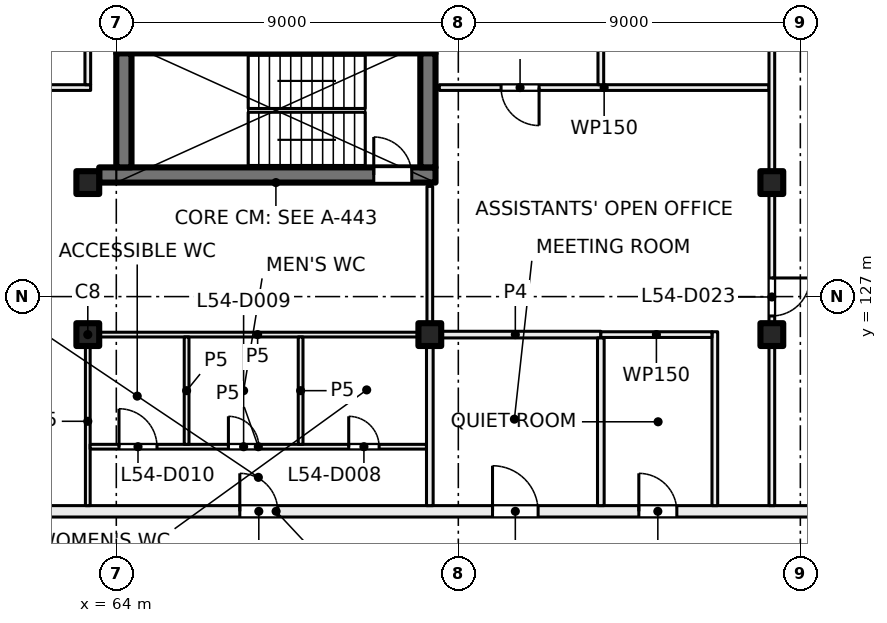
"""IFC4 building model, lengths in metres.
Left out: names, types, materials, properties, quantities, classifications, styles, units other than length and angle.
Written with IfcOpenShell. Run it as: python <this file> out.ifc"""

import sys

from ifc_helpers import new_model, si_unit, direction, frame, frame_2d, origin, origin_2d, place, context, subcontext, project, spatial, rectangle, extrude, element, fill, save


model = new_model("IFC4")
c1 = context("Model", 3, precision=1e-05, world=origin(), true_north=direction((0.0, 1.0)))
c2 = subcontext(c1, "Body", "Model", "MODEL_VIEW")
j1 = project(units=[si_unit("LENGTHUNIT", "METRE"), si_unit("PLANEANGLEUNIT", "RADIAN")], contexts=[c1])
p1 = place(None, origin())
s1 = spatial("IfcSite", under=j1, at=p1, CompositionType="ELEMENT")
p2 = place(p1, origin())
s2 = spatial("IfcBuilding", under=s1, at=p2, CompositionType="ELEMENT")
p3 = place(p2, frame((0.0, 0.0, 228.0)))
s3 = spatial("IfcBuildingStorey", under=s2, at=p3, CompositionType="ELEMENT", Elevation=228.0)
for number, where, z_axis, x_axis in (
    (1, (63.25, 130.0, 0.0), (0.0, 0.0, 1.0), (1.0, 0.0, 0.0)),
    (2, (81.25, 130.0, 0.0), (0.0, 0.0, 1.0), (1.0, 0.0, 0.0)),
    (3, (63.25, 126.0, 0.0), (0.0, 0.0, 1.0), (1.0, 0.0, 0.0)),
    (4, (72.25, 126.0, 0.0), (0.0, 0.0, 1.0), (1.0, 0.0, 0.0)),
    (5, (81.25, 126.0, 0.0), (0.0, 0.0, 1.0), (1.0, 0.0, 0.0)),
):
    element("IfcColumn", number, at=place(p3, frame(where, z_axis=z_axis, x_axis=x_axis)), inside=s3, PredefinedType="COLUMN", context=c2, shape_type="SweptSolid", body=[
        extrude(rectangle(XDim=0.6, YDim=0.6, at=origin_2d()), origin(), (0.0, 0.0, 1.0), 4.0),
    ])
p4 = place(p3, frame((63.55, 130.2, 0.0), z_axis=(0.0, 0.0, 1.0), x_axis=(1.0, 0.0, 0.0)))
e6 = element("IfcWall", 6, at=p4, inside=s3, PredefinedType="SHEAR", context=c2, shape_type="SweptSolid", body=[
    extrude(rectangle(XDim=8.85, YDim=0.4, at=frame_2d((4.425, 0.0))), origin(), (0.0, 0.0, 1.0), 4.0),
])
p5 = place(p4, frame((7.225, 0.0, 0.0)))
e7 = element("IfcOpeningElement", 7, at=p5, cuts=e6, PredefinedType="OPENING", context=c2, shape_type="SweptSolid", body=[
    extrude(rectangle(XDim=1.0, YDim=2.1, at=frame_2d((0.5, 1.05))), frame((0.0, 0.21, 0.0), z_axis=(0.0, -1.0, 0.0), x_axis=(1.0, 0.0, 0.0)), (0.0, 0.0, 1.0), 0.42),
])
p6 = place(p3, frame((64.0, 133.6, 0.0), z_axis=(0.0, 0.0, 1.0), x_axis=(1.0, 0.0, 0.0)))
e8 = element("IfcWall", 8, at=p6, inside=s3, PredefinedType="SHEAR", context=c2, shape_type="SweptSolid", body=[
    extrude(rectangle(XDim=8.4, YDim=0.4, at=frame_2d((4.2, 0.0))), origin(), (0.0, 0.0, 1.0), 4.0),
])
for number, where, z_axis, x_axis in (
    (9, (64.2, 130.4, 0.0), (0.0, 0.0, 1.0), (0.0, 1.0, 0.0)),
    (10, (72.2, 130.4, 0.0), (0.0, 0.0, 1.0), (0.0, 1.0, 0.0)),
):
    element("IfcWall", number, at=place(p3, frame(where, z_axis=z_axis, x_axis=x_axis)), inside=s3, PredefinedType="SHEAR", context=c2, shape_type="SweptSolid", body=[
        extrude(rectangle(XDim=3.0, YDim=0.4, at=frame_2d((1.5, 0.0))), origin(), (0.0, 0.0, 1.0), 4.0),
    ])
p7 = place(p3, frame((50.657, 121.35, 0.0), z_axis=(0.0, 0.0, 1.0), x_axis=(1.0, 0.0, 0.0)))
e11 = element("IfcWall", 11, at=p7, inside=s3, PredefinedType="PARTITIONING", context=c2, shape_type="SweptSolid", body=[
    extrude(rectangle(XDim=35.096, YDim=0.3, at=frame_2d((17.548, 0.0))), origin(), (0.0, 0.0, 1.0), 3.625),
])
p8 = place(p7, frame((27.093, 0.0, 0.0)))
e12 = element("IfcOpeningElement", 12, at=p8, cuts=e11, PredefinedType="OPENING", context=c2, shape_type="SweptSolid", body=[
    extrude(rectangle(XDim=1.0, YDim=2.1, at=frame_2d((0.5, 1.05))), frame((0.0, 0.16, 0.0), z_axis=(0.0, -1.0, 0.0), x_axis=(1.0, 0.0, 0.0)), (0.0, 0.0, 1.0), 0.32),
])
p9 = place(p7, frame((23.243, 0.0, 0.0)))
e13 = element("IfcOpeningElement", 13, at=p9, cuts=e11, PredefinedType="OPENING", context=c2, shape_type="SweptSolid", body=[
    extrude(rectangle(XDim=1.2, YDim=2.1, at=frame_2d((0.6, 1.05))), frame((0.0, 0.16, 0.0), z_axis=(0.0, -1.0, 0.0), x_axis=(1.0, 0.0, 0.0)), (0.0, 0.0, 1.0), 0.32),
])
p10 = place(p7, frame((31.943, 0.0, 0.0)))
e14 = element("IfcOpeningElement", 14, at=p10, cuts=e11, PredefinedType="OPENING", context=c2, shape_type="SweptSolid", body=[
    extrude(rectangle(XDim=1.8, YDim=2.1, at=frame_2d((0.9, 1.05))), frame((0.0, 0.16, 0.0), z_axis=(0.0, -1.0, 0.0), x_axis=(1.0, 0.0, 0.0)), (0.0, 0.0, 1.0), 0.32),
])
p11 = place(p7, frame((16.593, 0.0, 0.0)))
e15 = element("IfcOpeningElement", 15, at=p11, cuts=e11, PredefinedType="OPENING", context=c2, shape_type="SweptSolid", body=[
    extrude(rectangle(XDim=1.0, YDim=2.1, at=frame_2d((0.5, 1.05))), frame((0.0, 0.16, 0.0), z_axis=(0.0, -1.0, 0.0), x_axis=(1.0, 0.0, 0.0)), (0.0, 0.0, 1.0), 0.32),
])
p12 = place(p7, frame((7.193, 0.0, 0.0)))
e16 = element("IfcOpeningElement", 16, at=p12, cuts=e11, PredefinedType="OPENING", context=c2, shape_type="SweptSolid", body=[
    extrude(rectangle(XDim=1.8, YDim=2.1, at=frame_2d((0.9, 1.05))), frame((0.0, 0.16, 0.0), z_axis=(0.0, -1.0, 0.0), x_axis=(1.0, 0.0, 0.0)), (0.0, 0.0, 1.0), 0.32),
])
p13 = place(p7, frame((0.896, 0.0, 0.0)))
e17 = element("IfcOpeningElement", 17, at=p13, cuts=e11, PredefinedType="OPENING", context=c2, shape_type="SweptSolid", body=[
    extrude(rectangle(XDim=1.8, YDim=2.1, at=frame_2d((0.9, 1.05))), frame((0.0, 0.16, 0.0), z_axis=(0.0, -1.0, 0.0), x_axis=(1.0, 0.0, 0.0)), (0.0, 0.0, 1.0), 0.32),
])
p14 = place(p3, frame((63.325, 132.5, 0.0), z_axis=(0.0, 0.0, 1.0), x_axis=(-1.0, 0.0, 0.0)))
e18 = element("IfcWall", 18, at=p14, inside=s3, PredefinedType="PARTITIONING", context=c2, shape_type="SweptSolid", body=[
    extrude(rectangle(XDim=9.0, YDim=0.15, at=frame_2d((4.5, 0.0))), origin(), (0.0, 0.0, 1.0), 3.625),
])
p15 = place(p14, frame((6.298, 0.0, 0.0)))
e19 = element("IfcOpeningElement", 19, at=p15, cuts=e18, PredefinedType="OPENING", context=c2, shape_type="SweptSolid", body=[
    extrude(rectangle(XDim=1.0, YDim=2.1, at=frame_2d((0.5, 1.05))), frame((0.0, 0.085, 0.0), z_axis=(0.0, -1.0, 0.0), x_axis=(1.0, 0.0, 0.0)), (0.0, 0.0, 1.0), 0.17),
])
p16 = place(p3, frame((63.25, 121.5, 0.0), z_axis=(0.0, 0.0, 1.0), x_axis=(0.0, 1.0, 0.0)))
e20 = element("IfcWall", 20, at=p16, inside=s3, PredefinedType="PARTITIONING", context=c2, shape_type="SweptSolid", body=[
    extrude(rectangle(XDim=4.438, YDim=0.125, at=frame_2d((2.219, 0.0))), origin(), (0.0, 0.0, 1.0), 3.625),
])
p17 = place(p3, frame((63.312, 123.05, 0.0), z_axis=(0.0, 0.0, 1.0), x_axis=(1.0, 0.0, 0.0)))
e21 = element("IfcWall", 21, at=p17, inside=s3, PredefinedType="PARTITIONING", context=c2, shape_type="SweptSolid", body=[
    extrude(rectangle(XDim=8.85, YDim=0.125, at=frame_2d((4.425, 0.0))), origin(), (0.0, 0.0, 1.0), 3.625),
])
p18 = place(p17, frame((6.804, 0.0, 0.0)))
e22 = element("IfcOpeningElement", 22, at=p18, cuts=e21, PredefinedType="OPENING", context=c2, shape_type="SweptSolid", body=[
    extrude(rectangle(XDim=0.8, YDim=2.1, at=frame_2d((0.4, 1.05))), frame((0.0, 0.073, 0.0), z_axis=(0.0, -1.0, 0.0), x_axis=(1.0, 0.0, 0.0)), (0.0, 0.0, 1.0), 0.145),
])
p19 = place(p17, frame((3.638, 0.0, 0.0)))
e23 = element("IfcOpeningElement", 23, at=p19, cuts=e21, PredefinedType="OPENING", context=c2, shape_type="SweptSolid", body=[
    extrude(rectangle(XDim=0.8, YDim=2.1, at=frame_2d((0.4, 1.05))), frame((0.0, 0.073, 0.0), z_axis=(0.0, -1.0, 0.0), x_axis=(1.0, 0.0, 0.0)), (0.0, 0.0, 1.0), 0.145),
])
p20 = place(p17, frame((0.759, 0.0, 0.0)))
e24 = element("IfcOpeningElement", 24, at=p20, cuts=e21, PredefinedType="OPENING", context=c2, shape_type="SweptSolid", body=[
    extrude(rectangle(XDim=1.0, YDim=2.1, at=frame_2d((0.5, 1.05))), frame((0.0, 0.073, 0.0), z_axis=(0.0, -1.0, 0.0), x_axis=(1.0, 0.0, 0.0)), (0.0, 0.0, 1.0), 0.145),
])
p21 = place(p3, frame((63.188, 126.0, 0.0), z_axis=(0.0, 0.0, 1.0), x_axis=(1.0, 0.0, 0.0)))
e25 = element("IfcWall", 25, at=p21, inside=s3, PredefinedType="PARTITIONING", context=c2, shape_type="SweptSolid", body=[
    extrude(rectangle(XDim=9.062, YDim=0.125, at=frame_2d((4.531, 0.0))), origin(), (0.0, 0.0, 1.0), 3.625),
])
p22 = place(p3, frame((63.25, 138.4, 0.0), z_axis=(0.0, 0.0, 1.0), x_axis=(0.0, -1.0, 0.0)))
e26 = element("IfcWall", 26, at=p22, inside=s3, PredefinedType="PARTITIONING", context=c2, shape_type="SweptSolid", body=[
    extrude(rectangle(XDim=5.825, YDim=0.15, at=frame_2d((2.913, 0.0))), origin(), (0.0, 0.0, 1.0), 3.625),
])
p23 = place(p22, frame((2.423, 0.0, 0.0)))
e27 = element("IfcOpeningElement", 27, at=p23, cuts=e26, PredefinedType="OPENING", context=c2, shape_type="SweptSolid", body=[
    extrude(rectangle(XDim=1.0, YDim=2.1, at=frame_2d((0.5, 1.05))), frame((0.0, 0.085, 0.0), z_axis=(0.0, -1.0, 0.0), x_axis=(1.0, 0.0, 0.0)), (0.0, 0.0, 1.0), 0.17),
])
for number, where, z_axis, x_axis in (
    (28, (65.85, 125.938, 0.0), (0.0, 0.0, 1.0), (0.0, -1.0, 0.0)),
    (29, (68.85, 125.938, 0.0), (0.0, 0.0, 1.0), (0.0, -1.0, 0.0)),
):
    element("IfcWall", number, at=place(p3, frame(where, z_axis=z_axis, x_axis=x_axis)), inside=s3, PredefinedType="PARTITIONING", context=c2, shape_type="SweptSolid", body=[
        extrude(rectangle(XDim=2.826, YDim=0.125, at=frame_2d((1.413, 0.0))), origin(), (0.0, 0.0, 1.0), 3.625),
    ])
p24 = place(p3, frame((72.25, 121.5, 0.0), z_axis=(0.0, 0.0, 1.0), x_axis=(0.0, 1.0, 0.0)))
e30 = element("IfcWall", 30, at=p24, inside=s3, PredefinedType="PARTITIONING", context=c2, shape_type="SweptSolid", body=[
    extrude(rectangle(XDim=4.5, YDim=0.175, at=frame_2d((2.25, 0.0))), origin(), (0.0, 0.0, 1.0), 3.625),
])
p25 = place(p3, frame((72.25, 126.0, 0.0), z_axis=(0.0, 0.0, 1.0), x_axis=(0.0, 1.0, 0.0)))
e31 = element("IfcWall", 31, at=p25, inside=s3, PredefinedType="PARTITIONING", context=c2, shape_type="SweptSolid", body=[
    extrude(rectangle(XDim=3.9, YDim=0.15, at=frame_2d((1.95, 0.0))), origin(), (0.0, 0.0, 1.0), 3.625),
])
p26 = place(p3, frame((72.25, 126.0, 0.0), z_axis=(0.0, 0.0, 1.0), x_axis=(1.0, 0.0, 0.0)))
e32 = element("IfcWall", 32, at=p26, inside=s3, PredefinedType="PARTITIONING", context=c2, shape_type="SweptSolid", body=[
    extrude(rectangle(XDim=4.5, YDim=0.175, at=frame_2d((2.25, 0.0))), origin(), (0.0, 0.0, 1.0), 3.625),
])
p27 = place(p3, frame((81.175, 132.5, 0.0), z_axis=(0.0, 0.0, 1.0), x_axis=(-1.0, 0.0, 0.0)))
e33 = element("IfcWall", 33, at=p27, inside=s3, PredefinedType="PARTITIONING", context=c2, shape_type="SweptSolid", body=[
    extrude(rectangle(XDim=8.675, YDim=0.15, at=frame_2d((4.337, 0.0))), origin(), (0.0, 0.0, 1.0), 3.625),
])
p28 = place(p27, frame((6.05, 0.0, 0.0)))
e34 = element("IfcOpeningElement", 34, at=p28, cuts=e33, PredefinedType="OPENING", context=c2, shape_type="SweptSolid", body=[
    extrude(rectangle(XDim=1.0, YDim=2.1, at=frame_2d((0.5, 1.05))), frame((0.0, 0.085, 0.0), z_axis=(0.0, -1.0, 0.0), x_axis=(1.0, 0.0, 0.0)), (0.0, 0.0, 1.0), 0.17),
])
p29 = place(p3, frame((76.75, 125.912, 0.0), z_axis=(0.0, 0.0, 1.0), x_axis=(0.0, -1.0, 0.0)))
e35 = element("IfcWall", 35, at=p29, inside=s3, PredefinedType="PARTITIONING", context=c2, shape_type="SweptSolid", body=[
    extrude(rectangle(XDim=4.412, YDim=0.175, at=frame_2d((2.206, 0.0))), origin(), (0.0, 0.0, 1.0), 3.625),
])
p30 = place(p3, frame((76.75, 132.575, 0.0), z_axis=(0.0, 0.0, 1.0), x_axis=(0.0, 1.0, 0.0)))
e36 = element("IfcWall", 36, at=p30, inside=s3, PredefinedType="PARTITIONING", context=c2, shape_type="SweptSolid", body=[
    extrude(rectangle(XDim=5.825, YDim=0.15, at=frame_2d((2.913, 0.0))), origin(), (0.0, 0.0, 1.0), 3.625),
])
p31 = place(p3, frame((79.75, 121.5, 0.0), z_axis=(0.0, 0.0, 1.0), x_axis=(0.0, 1.0, 0.0)))
e37 = element("IfcWall", 37, at=p31, inside=s3, PredefinedType="PARTITIONING", context=c2, shape_type="SweptSolid", body=[
    extrude(rectangle(XDim=4.575, YDim=0.15, at=frame_2d((2.288, 0.0))), origin(), (0.0, 0.0, 1.0), 3.625),
])
p32 = place(p3, frame((79.675, 126.0, 0.0), z_axis=(0.0, 0.0, 1.0), x_axis=(-1.0, 0.0, 0.0)))
e38 = element("IfcWall", 38, at=p32, inside=s3, PredefinedType="PARTITIONING", context=c2, shape_type="SweptSolid", body=[
    extrude(rectangle(XDim=2.925, YDim=0.15, at=frame_2d((1.462, 0.0))), origin(), (0.0, 0.0, 1.0), 3.625),
])
p33 = place(p3, frame((81.25, 138.4, 0.0), z_axis=(0.0, 0.0, 1.0), x_axis=(0.0, -1.0, 0.0)))
e39 = element("IfcWall", 39, at=p33, inside=s3, PredefinedType="PARTITIONING", context=c2, shape_type="SweptSolid", body=[
    extrude(rectangle(XDim=16.9, YDim=0.15, at=frame_2d((8.45, 0.0))), origin(), (0.0, 0.0, 1.0), 3.625),
])
p34 = place(p33, frame((2.45, 0.0, 0.0)))
e40 = element("IfcOpeningElement", 40, at=p34, cuts=e39, PredefinedType="OPENING", context=c2, shape_type="SweptSolid", body=[
    extrude(rectangle(XDim=1.0, YDim=2.1, at=frame_2d((0.5, 1.05))), frame((0.0, 0.085, 0.0), z_axis=(0.0, -1.0, 0.0), x_axis=(1.0, 0.0, 0.0)), (0.0, 0.0, 1.0), 0.17),
])
p35 = place(p33, frame((10.91, 0.0, 0.0)))
e41 = element("IfcOpeningElement", 41, at=p35, cuts=e39, PredefinedType="OPENING", context=c2, shape_type="SweptSolid", body=[
    extrude(rectangle(XDim=1.0, YDim=2.1, at=frame_2d((0.5, 1.05))), frame((0.0, 0.085, 0.0), z_axis=(0.0, -1.0, 0.0), x_axis=(1.0, 0.0, 0.0)), (0.0, 0.0, 1.0), 0.17),
])
p36 = place(p5, origin())
e42 = element("IfcDoor", 42, at=p36, inside=s3, OperationType="SINGLE_SWING_LEFT", PredefinedType="DOOR", context=c2, shape_type="SweptSolid", body=[
    extrude(rectangle(XDim=1.0, YDim=2.1, at=frame_2d((0.5, 1.05))), frame((0.0, 0.025, 0.0), z_axis=(0.0, -1.0, 0.0), x_axis=(1.0, 0.0, 0.0)), (0.0, 0.0, 1.0), 0.05),
])
fill(e7, e42)
p37 = place(p8, origin())
e43 = element("IfcDoor", 43, at=p37, inside=s3, OperationType="SINGLE_SWING_LEFT", PredefinedType="DOOR", context=c2, shape_type="SweptSolid", body=[
    extrude(rectangle(XDim=1.0, YDim=2.1, at=frame_2d((0.5, 1.05))), frame((0.0, 0.025, 0.0), z_axis=(0.0, -1.0, 0.0), x_axis=(1.0, 0.0, 0.0)), (0.0, 0.0, 1.0), 0.05),
])
fill(e12, e43)
p38 = place(p9, origin())
e44 = element("IfcDoor", 44, at=p38, inside=s3, OperationType="DOUBLE_DOOR_SINGLE_SWING", PredefinedType="DOOR", context=c2, shape_type="SweptSolid", body=[
    extrude(rectangle(XDim=1.2, YDim=2.1, at=frame_2d((0.6, 1.05))), frame((0.0, 0.025, 0.0), z_axis=(0.0, -1.0, 0.0), x_axis=(1.0, 0.0, 0.0)), (0.0, 0.0, 1.0), 0.05),
])
fill(e13, e44)
p39 = place(p28, origin())
e45 = element("IfcDoor", 45, at=p39, inside=s3, OperationType="SINGLE_SWING_RIGHT", PredefinedType="DOOR", context=c2, shape_type="SweptSolid", body=[
    extrude(rectangle(XDim=1.0, YDim=2.1, at=frame_2d((0.5, 1.05))), frame((0.0, 0.025, 0.0), z_axis=(0.0, -1.0, 0.0), x_axis=(1.0, 0.0, 0.0)), (0.0, 0.0, 1.0), 0.05),
])
fill(e34, e45)
p40 = place(p11, origin())
e46 = element("IfcDoor", 46, at=p40, inside=s3, OperationType="SINGLE_SWING_LEFT", PredefinedType="DOOR", context=c2, shape_type="SweptSolid", body=[
    extrude(rectangle(XDim=1.0, YDim=2.1, at=frame_2d((0.5, 1.05))), frame((0.0, 0.025, 0.0), z_axis=(0.0, -1.0, 0.0), x_axis=(1.0, 0.0, 0.0)), (0.0, 0.0, 1.0), 0.05),
])
fill(e15, e46)
p41 = place(p18, origin())
e47 = element("IfcDoor", 47, at=p41, inside=s3, OperationType="SINGLE_SWING_RIGHT", PredefinedType="DOOR", context=c2, shape_type="SweptSolid", body=[
    extrude(rectangle(XDim=0.8, YDim=2.1, at=frame_2d((0.4, 1.05))), frame((0.0, 0.025, 0.0), z_axis=(0.0, -1.0, 0.0), x_axis=(1.0, 0.0, 0.0)), (0.0, 0.0, 1.0), 0.05),
])
fill(e22, e47)
p42 = place(p19, origin())
e48 = element("IfcDoor", 48, at=p42, inside=s3, OperationType="SINGLE_SWING_LEFT", PredefinedType="DOOR", context=c2, shape_type="SweptSolid", body=[
    extrude(rectangle(XDim=0.8, YDim=2.1, at=frame_2d((0.4, 1.05))), frame((0.0, 0.025, 0.0), z_axis=(0.0, -1.0, 0.0), x_axis=(1.0, 0.0, 0.0)), (0.0, 0.0, 1.0), 0.05),
])
fill(e23, e48)
p43 = place(p20, origin())
e49 = element("IfcDoor", 49, at=p43, inside=s3, OperationType="SINGLE_SWING_LEFT", PredefinedType="DOOR", context=c2, shape_type="SweptSolid", body=[
    extrude(rectangle(XDim=1.0, YDim=2.1, at=frame_2d((0.5, 1.05))), frame((0.0, 0.025, 0.0), z_axis=(0.0, -1.0, 0.0), x_axis=(1.0, 0.0, 0.0)), (0.0, 0.0, 1.0), 0.05),
])
fill(e24, e49)
p44 = place(p35, origin())
e50 = element("IfcDoor", 50, at=p44, inside=s3, OperationType="SINGLE_SWING_RIGHT", PredefinedType="DOOR", context=c2, shape_type="SweptSolid", body=[
    extrude(rectangle(XDim=1.0, YDim=2.1, at=frame_2d((0.5, 1.05))), frame((0.0, 0.025, 0.0), z_axis=(0.0, -1.0, 0.0), x_axis=(1.0, 0.0, 0.0)), (0.0, 0.0, 1.0), 0.05),
])
fill(e41, e50)
save(model, sys.argv[1])
